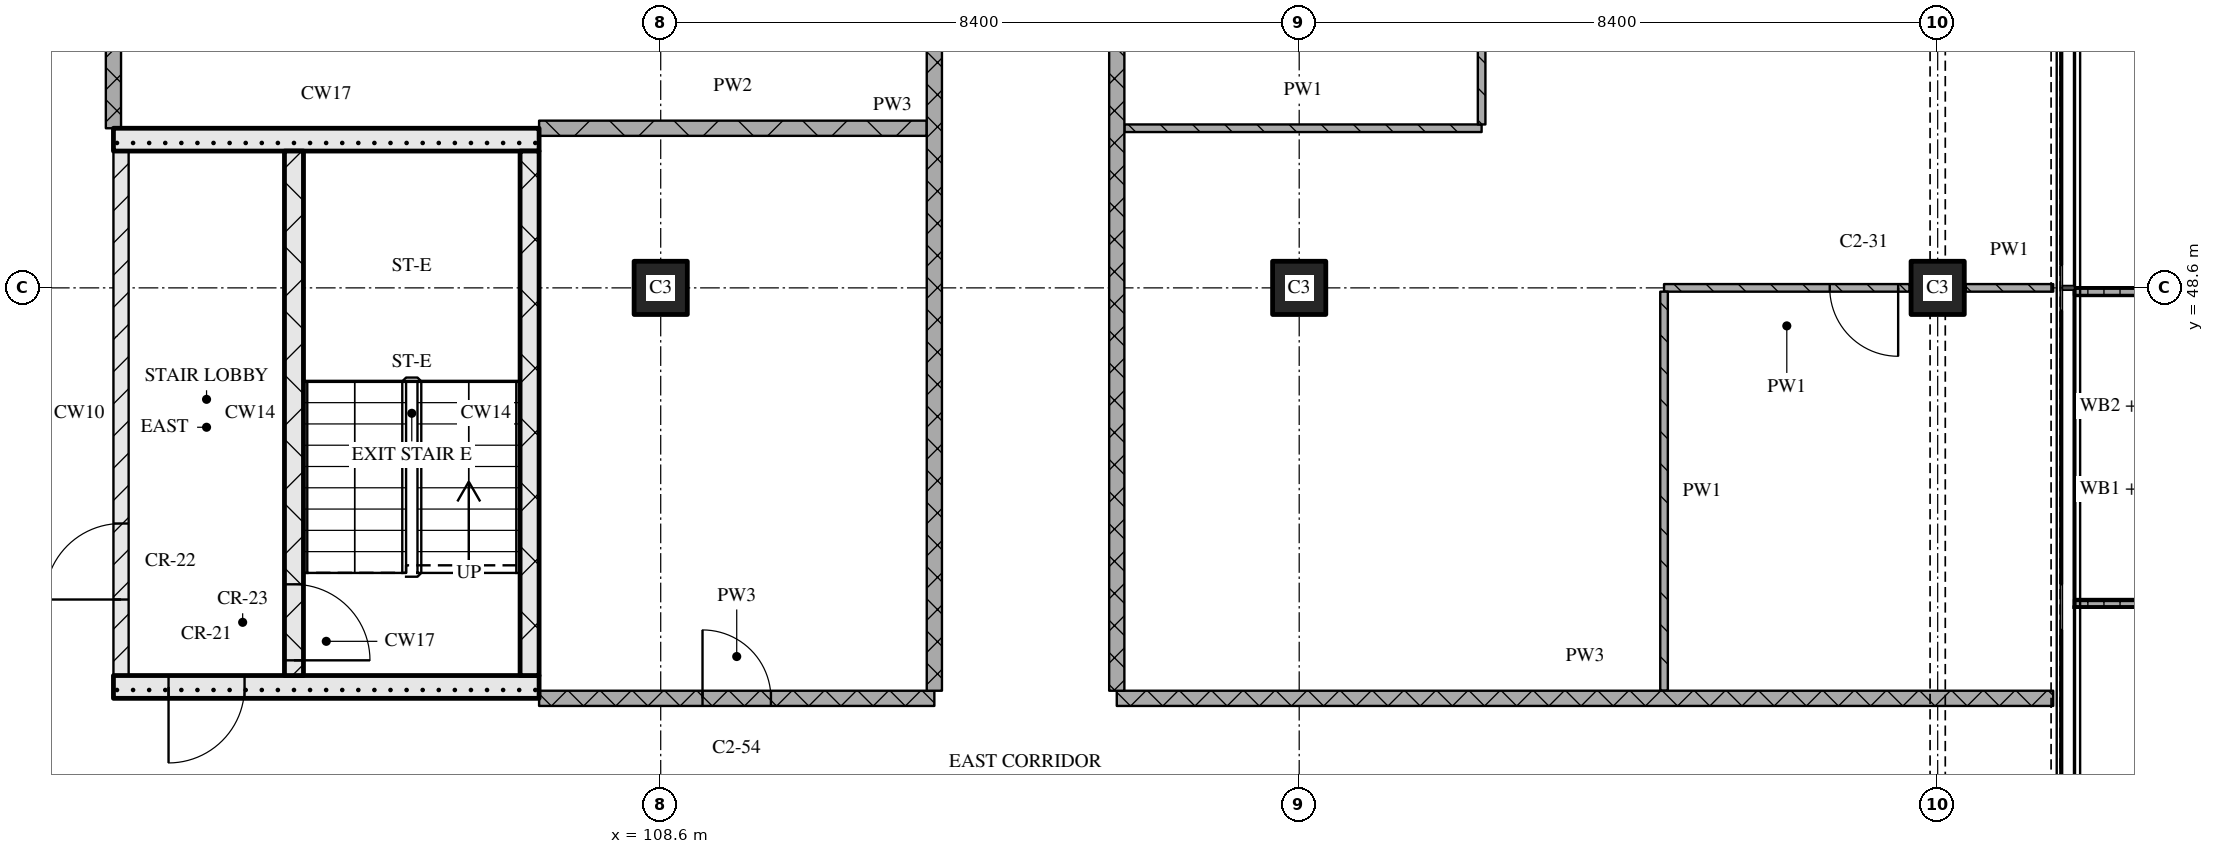
"""IFC4 building model, lengths in metres.
Left out: names, types, materials, properties, quantities, classifications, styles, units other than length and angle.
Written with IfcOpenShell. Run it as: python <this file> out.ifc"""

import sys

from ifc_helpers import new_model, si_unit, direction, frame, frame_2d, origin, origin_2d, place, context, subcontext, project, spatial, polyline, rectangle, outline, extrude, element, fill, save


model = new_model("IFC4")
c1 = context("Model", 3, precision=1e-05, world=origin(), true_north=direction((0.0, 1.0)))
c2 = subcontext(c1, "Body", "Model", "MODEL_VIEW")
j1 = project(units=[si_unit("LENGTHUNIT", "METRE"), si_unit("PLANEANGLEUNIT", "RADIAN")], contexts=[c1])
p1 = place(None, origin())
s1 = spatial("IfcSite", under=j1, at=p1, CompositionType="ELEMENT")
p2 = place(p1, origin())
s2 = spatial("IfcBuilding", under=s1, at=p2, CompositionType="ELEMENT")
p3 = place(p2, frame((0.0, 0.0, 158.25)))
s3 = spatial("IfcBuildingStorey", under=s2, at=p3, CompositionType="ELEMENT", Elevation=158.25)
for number, where, z_axis, x_axis in (
    (1, (108.6, 48.6, 0.0), (0.0, 0.0, 1.0), (1.0, 0.0, 0.0)),
    (2, (117.0, 48.6, 0.0), (0.0, 0.0, 1.0), (1.0, 0.0, 0.0)),
    (3, (125.4, 48.6, 0.0), (0.0, 0.0, 1.0), (1.0, 0.0, 0.0)),
):
    element("IfcColumn", number, at=place(p3, frame(where, z_axis=z_axis, x_axis=x_axis)), inside=s3, PredefinedType="COLUMN", context=c2, shape_type="SweptSolid", body=[
        extrude(rectangle(XDim=0.7, YDim=0.7, at=origin_2d()), origin(), (0.0, 0.0, 1.0), 3.6),
    ])
p4 = place(p3, origin())
e4 = element("IfcWall", 4, at=p4, inside=s3, PredefinedType="SOLIDWALL", context=c2, shape_type="SweptSolid", body=[
    extrude(outline(polyline([(127.2, 44.4), (127.2, 44.5), (128.833, 44.5), (128.833, 48.5), (127.2, 48.5), (127.2, 48.6), (128.933, 48.6), (128.933, 44.4), (127.2, 44.4)])), origin(), (0.0, 0.0, 1.0), 1.0),
])
p5 = place(p3, frame((101.4, 43.35, 0.0), z_axis=(0.0, 0.0, 1.0), x_axis=(1.0, 0.0, 0.0)))
e5 = element("IfcWall", 5, at=p5, inside=s3, PredefinedType="SOLIDWALL", context=c2, shape_type="SweptSolid", body=[
    extrude(rectangle(XDim=5.6, YDim=0.3, at=frame_2d((2.8, 0.0))), origin(), (0.0, 0.0, 1.0), 3.32),
])
p6 = place(p5, frame((0.725, 0.0, 0.0)))
e6 = element("IfcOpeningElement", 6, at=p6, cuts=e5, PredefinedType="OPENING", context=c2, shape_type="SweptSolid", body=[
    extrude(rectangle(XDim=1.0, YDim=2.1, at=frame_2d((0.5, 1.05))), frame((0.0, 0.16, 0.0), z_axis=(0.0, -1.0, 0.0), x_axis=(1.0, 0.0, 0.0)), (0.0, 0.0, 1.0), 0.32),
])
p7 = place(p3, frame((101.5, 43.5, 0.0), z_axis=(0.0, 0.0, 1.0), x_axis=(0.0, 1.0, 0.0)))
e7 = element("IfcWall", 7, at=p7, inside=s3, PredefinedType="PARTITIONING", context=c2, shape_type="SweptSolid", body=[
    extrude(rectangle(XDim=6.9, YDim=0.2, at=frame_2d((3.45, 0.0))), origin(), (0.0, 0.0, 1.0), 3.32),
])
p8 = place(p7, frame((1.0, 0.0, 0.0)))
e8 = element("IfcOpeningElement", 8, at=p8, cuts=e7, PredefinedType="OPENING", context=c2, shape_type="SweptSolid", body=[
    extrude(rectangle(XDim=1.0, YDim=2.1, at=frame_2d((0.5, 1.05))), frame((0.0, 0.11, 0.0), z_axis=(0.0, -1.0, 0.0), x_axis=(1.0, 0.0, 0.0)), (0.0, 0.0, 1.0), 0.22),
])
p9 = place(p3, frame((103.775, 43.5, 0.0), z_axis=(0.0, 0.0, 1.0), x_axis=(0.0, 1.0, 0.0)))
e9 = element("IfcWall", 9, at=p9, inside=s3, PredefinedType="SOLIDWALL", context=c2, shape_type="SweptSolid", body=[
    extrude(rectangle(XDim=6.9, YDim=0.25, at=frame_2d((3.45, 0.0))), origin(), (0.0, 0.0, 1.0), 3.32),
])
p10 = place(p9, frame((0.2, 0.0, 0.0)))
e10 = element("IfcOpeningElement", 10, at=p10, cuts=e9, PredefinedType="OPENING", context=c2, shape_type="SweptSolid", body=[
    extrude(rectangle(XDim=1.0, YDim=2.1, at=frame_2d((0.5, 1.05))), frame((0.0, 0.135, 0.0), z_axis=(0.0, -1.0, 0.0), x_axis=(1.0, 0.0, 0.0)), (0.0, 0.0, 1.0), 0.27),
])
p11 = place(p3, frame((106.875, 43.5, 0.0), z_axis=(0.0, 0.0, 1.0), x_axis=(0.0, 1.0, 0.0)))
e11 = element("IfcWall", 11, at=p11, inside=s3, PredefinedType="SOLIDWALL", context=c2, shape_type="SweptSolid", body=[
    extrude(rectangle(XDim=6.9, YDim=0.25, at=frame_2d((3.45, 0.0))), origin(), (0.0, 0.0, 1.0), 3.32),
])
p12 = place(p3, frame((101.4, 50.55, 0.0), z_axis=(0.0, 0.0, 1.0), x_axis=(1.0, 0.0, 0.0)))
e12 = element("IfcWall", 12, at=p12, inside=s3, PredefinedType="SOLIDWALL", context=c2, shape_type="SweptSolid", body=[
    extrude(rectangle(XDim=5.6, YDim=0.3, at=frame_2d((2.8, 0.0))), origin(), (0.0, 0.0, 1.0), 3.32),
])
p13 = place(p3, frame((107.0, 43.2, 0.0), z_axis=(0.0, 0.0, 1.0), x_axis=(1.0, 0.0, 0.0)))
e13 = element("IfcWall", 13, at=p13, inside=s3, PredefinedType="PARTITIONING", context=c2, shape_type="SweptSolid", body=[
    extrude(rectangle(XDim=5.2, YDim=0.2, at=frame_2d((2.6, 0.0))), origin(), (0.0, 0.0, 1.0), 3.32),
])
p14 = place(p13, frame((2.15, 0.0, 0.0)))
e14 = element("IfcOpeningElement", 14, at=p14, cuts=e13, PredefinedType="OPENING", context=c2, shape_type="SweptSolid", body=[
    extrude(rectangle(XDim=0.9, YDim=2.1, at=frame_2d((0.45, 1.05))), frame((0.0, 0.11, 0.0), z_axis=(0.0, -1.0, 0.0), x_axis=(1.0, 0.0, 0.0)), (0.0, 0.0, 1.0), 0.22),
])
p15 = place(p3, frame((114.6, 43.2, 0.0), z_axis=(0.0, 0.0, 1.0), x_axis=(1.0, 0.0, 0.0)))
e15 = element("IfcWall", 15, at=p15, inside=s3, PredefinedType="PARTITIONING", context=c2, shape_type="SweptSolid", body=[
    extrude(rectangle(XDim=12.32, YDim=0.2, at=frame_2d((6.16, 0.0))), origin(), (0.0, 0.0, 1.0), 3.32),
])
p16 = place(p3, frame((125.03, 48.6, 0.0), z_axis=(0.0, 0.0, 1.0), x_axis=(-1.0, 0.0, 0.0)))
e16 = element("IfcWall", 16, at=p16, inside=s3, PredefinedType="PARTITIONING", context=c2, shape_type="SweptSolid", body=[
    extrude(rectangle(XDim=3.23, YDim=0.1, at=frame_2d((1.615, 0.0))), origin(), (0.0, 0.0, 1.0), 3.32),
])
p17 = place(p16, frame((0.15, 0.0, 0.0)))
e17 = element("IfcOpeningElement", 17, at=p17, cuts=e16, PredefinedType="OPENING", context=c2, shape_type="SweptSolid", body=[
    extrude(rectangle(XDim=0.9, YDim=2.1, at=frame_2d((0.45, 1.05))), frame((0.0, 0.06, 0.0), z_axis=(0.0, -1.0, 0.0), x_axis=(1.0, 0.0, 0.0)), (0.0, 0.0, 1.0), 0.12),
])
p18 = place(p3, frame((125.77, 48.6, 0.0), z_axis=(0.0, 0.0, 1.0), x_axis=(1.0, 0.0, 0.0)))
e18 = element("IfcWall", 18, at=p18, inside=s3, PredefinedType="PARTITIONING", context=c2, shape_type="SweptSolid", body=[
    extrude(rectangle(XDim=1.15, YDim=0.1, at=frame_2d((0.575, 0.0))), origin(), (0.0, 0.0, 1.0), 3.32),
])
p19 = place(p3, frame((107.0, 50.7, 0.0), z_axis=(0.0, 0.0, 1.0), x_axis=(1.0, 0.0, 0.0)))
e19 = element("IfcWall", 19, at=p19, inside=s3, PredefinedType="PARTITIONING", context=c2, shape_type="SweptSolid", body=[
    extrude(rectangle(XDim=5.1, YDim=0.2, at=frame_2d((2.55, 0.0))), origin(), (0.0, 0.0, 1.0), 3.32),
])
p20 = place(p3, frame((114.7, 50.7, 0.0), z_axis=(0.0, 0.0, 1.0), x_axis=(1.0, 0.0, 0.0)))
e20 = element("IfcWall", 20, at=p20, inside=s3, PredefinedType="PARTITIONING", context=c2, shape_type="SweptSolid", body=[
    extrude(rectangle(XDim=4.7, YDim=0.1, at=frame_2d((2.35, 0.0))), origin(), (0.0, 0.0, 1.0), 3.32),
])
p21 = place(p3, frame((101.4, 58.7, 0.0), z_axis=(0.0, 0.0, 1.0), x_axis=(0.0, -1.0, 0.0)))
e21 = element("IfcWall", 21, at=p21, inside=s3, PredefinedType="PARTITIONING", context=c2, shape_type="SweptSolid", body=[
    extrude(rectangle(XDim=8.0, YDim=0.2, at=frame_2d((4.0, 0.0))), origin(), (0.0, 0.0, 1.0), 3.32),
])
p22 = place(p21, frame((1.225, 0.0, 0.9)))
e22 = element("IfcOpeningElement", 22, at=p22, cuts=e21, PredefinedType="OPENING", context=c2, shape_type="SweptSolid", body=[
    extrude(rectangle(XDim=1.5, YDim=1.5, at=frame_2d((0.75, 0.75))), frame((0.0, 0.11, 0.0), z_axis=(0.0, -1.0, 0.0), x_axis=(1.0, 0.0, 0.0)), (0.0, 0.0, 1.0), 0.22),
])
p23 = place(p3, frame((112.2, 43.3, 0.0), z_axis=(0.0, 0.0, 1.0), x_axis=(0.0, 1.0, 0.0)))
e23 = element("IfcWall", 23, at=p23, inside=s3, PredefinedType="PARTITIONING", context=c2, shape_type="SweptSolid", body=[
    extrude(rectangle(XDim=15.4, YDim=0.2, at=frame_2d((7.7, 0.0))), origin(), (0.0, 0.0, 1.0), 3.32),
])
p24 = place(p23, frame((10.95, 0.0, 0.0)))
e24 = element("IfcOpeningElement", 24, at=p24, cuts=e23, PredefinedType="OPENING", context=c2, shape_type="SweptSolid", body=[
    extrude(rectangle(XDim=1.0, YDim=2.1, at=frame_2d((0.5, 1.05))), frame((0.0, 0.11, 0.0), z_axis=(0.0, -1.0, 0.0), x_axis=(1.0, 0.0, 0.0)), (0.0, 0.0, 1.0), 0.22),
])
p25 = place(p3, frame((114.6, 61.1, 0.0), z_axis=(0.0, 0.0, 1.0), x_axis=(0.0, -1.0, 0.0)))
e25 = element("IfcWall", 25, at=p25, inside=s3, PredefinedType="PARTITIONING", context=c2, shape_type="SweptSolid", body=[
    extrude(rectangle(XDim=17.8, YDim=0.2, at=frame_2d((8.9, 0.0))), origin(), (0.0, 0.0, 1.0), 3.32),
])
p26 = place(p25, frame((5.25, 0.0, 0.0)))
e26 = element("IfcOpeningElement", 26, at=p26, cuts=e25, PredefinedType="OPENING", context=c2, shape_type="SweptSolid", body=[
    extrude(rectangle(XDim=1.0, YDim=2.1, at=frame_2d((0.5, 1.05))), frame((0.0, 0.11, 0.0), z_axis=(0.0, -1.0, 0.0), x_axis=(1.0, 0.0, 0.0)), (0.0, 0.0, 1.0), 0.22),
])
p27 = place(p3, frame((119.4, 54.55, 0.0), z_axis=(0.0, 0.0, 1.0), x_axis=(0.0, -1.0, 0.0)))
e27 = element("IfcWall", 27, at=p27, inside=s3, PredefinedType="PARTITIONING", context=c2, shape_type="SweptSolid", body=[
    extrude(rectangle(XDim=3.8, YDim=0.1, at=frame_2d((1.9, 0.0))), origin(), (0.0, 0.0, 1.0), 3.32),
])
p28 = place(p3, frame((121.8, 48.55, 0.0), z_axis=(0.0, 0.0, 1.0), x_axis=(0.0, -1.0, 0.0)))
e28 = element("IfcWall", 28, at=p28, inside=s3, PredefinedType="PARTITIONING", context=c2, shape_type="SweptSolid", body=[
    extrude(rectangle(XDim=5.25, YDim=0.1, at=frame_2d((2.625, 0.0))), origin(), (0.0, 0.0, 1.0), 3.32),
])
p29 = place(p6, origin())
e29 = element("IfcDoor", 29, at=p29, inside=s3, OperationType="SINGLE_SWING_RIGHT", PredefinedType="DOOR", context=c2, shape_type="SweptSolid", body=[
    extrude(rectangle(XDim=1.0, YDim=2.1, at=frame_2d((0.5, 1.05))), frame((0.0, 0.025, 0.0), z_axis=(0.0, -1.0, 0.0), x_axis=(1.0, 0.0, 0.0)), (0.0, 0.0, 1.0), 0.05),
])
fill(e6, e29)
p30 = place(p10, origin())
e30 = element("IfcDoor", 30, at=p30, inside=s3, OperationType="SINGLE_SWING_RIGHT", PredefinedType="DOOR", context=c2, shape_type="SweptSolid", body=[
    extrude(rectangle(XDim=1.0, YDim=2.1, at=frame_2d((0.5, 1.05))), frame((0.0, 0.025, 0.0), z_axis=(0.0, -1.0, 0.0), x_axis=(1.0, 0.0, 0.0)), (0.0, 0.0, 1.0), 0.05),
])
fill(e10, e30)
p31 = place(p8, origin())
e31 = element("IfcDoor", 31, at=p31, inside=s3, OperationType="SINGLE_SWING_LEFT", PredefinedType="DOOR", context=c2, shape_type="SweptSolid", body=[
    extrude(rectangle(XDim=1.0, YDim=2.1, at=frame_2d((0.5, 1.05))), frame((0.0, 0.025, 0.0), z_axis=(0.0, -1.0, 0.0), x_axis=(1.0, 0.0, 0.0)), (0.0, 0.0, 1.0), 0.05),
])
fill(e8, e31)
p32 = place(p14, origin())
e32 = element("IfcDoor", 32, at=p32, inside=s3, OperationType="SINGLE_SWING_LEFT", PredefinedType="DOOR", context=c2, shape_type="SweptSolid", body=[
    extrude(rectangle(XDim=0.9, YDim=2.1, at=frame_2d((0.45, 1.05))), frame((0.0, 0.025, 0.0), z_axis=(0.0, -1.0, 0.0), x_axis=(1.0, 0.0, 0.0)), (0.0, 0.0, 1.0), 0.05),
])
fill(e14, e32)
p33 = place(p17, origin())
e33 = element("IfcDoor", 33, at=p33, inside=s3, OperationType="SINGLE_SWING_LEFT", PredefinedType="DOOR", context=c2, shape_type="SweptSolid", body=[
    extrude(rectangle(XDim=0.9, YDim=2.1, at=frame_2d((0.45, 1.05))), frame((0.0, 0.025, 0.0), z_axis=(0.0, -1.0, 0.0), x_axis=(1.0, 0.0, 0.0)), (0.0, 0.0, 1.0), 0.05),
])
fill(e17, e33)
save(model, sys.argv[1])
